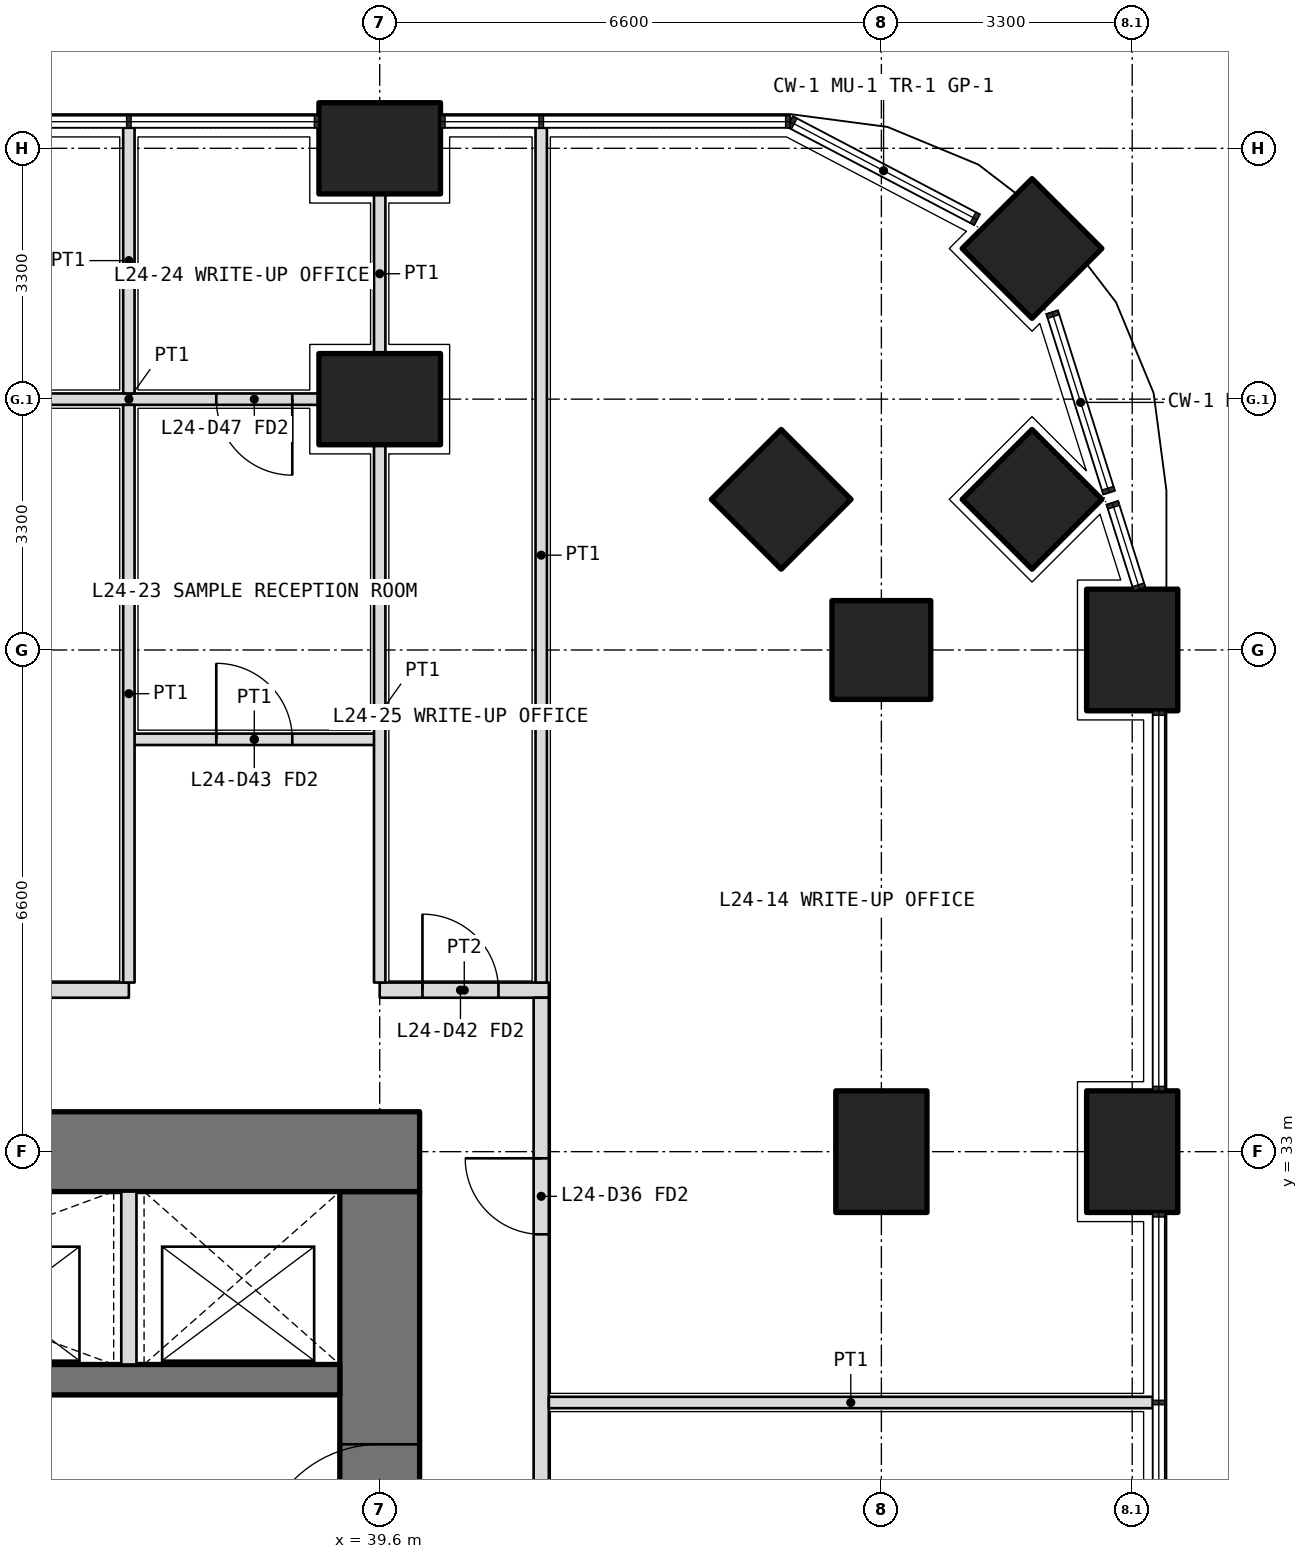
"""IFC4 building model, lengths in metres.
Left out: names, types, materials, properties, quantities, classifications, styles, units other than length and angle.
Written with IfcOpenShell. Run it as: python <this file> out.ifc"""

import sys

from ifc_helpers import new_model, si_unit, direction, frame, frame_2d, origin, origin_2d, place, context, subcontext, project, spatial, rectangle, extrude, element, fill, save


model = new_model("IFC4")
c1 = context("Model", 3, precision=1e-05, world=origin(), true_north=direction((0.0, 1.0)))
c2 = subcontext(c1, "Body", "Model", "MODEL_VIEW")
j1 = project(units=[si_unit("LENGTHUNIT", "METRE"), si_unit("PLANEANGLEUNIT", "RADIAN")], contexts=[c1])
p1 = place(None, origin())
s1 = spatial("IfcSite", under=j1, at=p1, CompositionType="ELEMENT")
p2 = place(p1, origin())
s2 = spatial("IfcBuilding", under=s1, at=p2, CompositionType="ELEMENT")
p3 = place(p2, frame((0.0, 0.0, 107.4)))
s3 = spatial("IfcBuildingStorey", under=s2, at=p3, CompositionType="ELEMENT", Elevation=107.4)
p4 = place(p3, frame((48.182, 44.882, 0.0), z_axis=(0.0, 0.0, 1.0), x_axis=(0.707106781187, 0.707106781187, 0.0)))
e1 = element("IfcColumn", 1, at=p4, inside=s3, PredefinedType="COLUMN", context=c2, shape_type="SweptSolid", body=[
    extrude(rectangle(XDim=1.3, YDim=1.3, at=origin_2d()), origin(), (0.0, 0.0, 1.0), 4.2),
])
for number, where, z_axis, x_axis in (
    (2, (49.5, 33.0, 0.0), (0.0, 0.0, 1.0), (0.0, 1.0, 0.0)),
    (3, (49.5, 39.6, 0.0), (0.0, 0.0, 1.0), (0.0, 1.0, 0.0)),
    (4, (39.6, 46.2, 0.0), (0.0, 0.0, 1.0), (1.0, 0.0, 0.0)),
):
    element("IfcColumn", number, at=place(p3, frame(where, z_axis=z_axis, x_axis=x_axis)), inside=s3, PredefinedType="COLUMN", context=c2, shape_type="SweptSolid", body=[
        extrude(rectangle(XDim=1.6, YDim=1.2, at=origin_2d()), origin(), (0.0, 0.0, 1.0), 4.2),
    ])
for number, where, z_axis, x_axis in (
    (5, (46.2, 39.6, 0.0), (0.0, 0.0, 1.0), (1.0, 0.0, 0.0)),
    (6, (48.182, 41.582, 0.0), (0.0, 0.0, 1.0), (0.707, 0.707, 0.0)),
):
    element("IfcColumn", number, at=place(p3, frame(where, z_axis=z_axis, x_axis=x_axis)), inside=s3, PredefinedType="COLUMN", context=c2, shape_type="SweptSolid", body=[
        extrude(rectangle(XDim=1.3, YDim=1.3, at=origin_2d()), origin(), (0.0, 0.0, 1.0), 4.2),
    ])
p5 = place(p3, frame((39.6, 42.9, 0.0), z_axis=(0.0, 0.0, 1.0), x_axis=(1.0, 0.0, 0.0)))
e7 = element("IfcColumn", 7, at=p5, inside=s3, PredefinedType="COLUMN", context=c2, shape_type="SweptSolid", body=[
    extrude(rectangle(XDim=1.6, YDim=1.2, at=origin_2d()), origin(), (0.0, 0.0, 1.0), 4.2),
])
p6 = place(p3, frame((44.882, 41.582, 0.0), z_axis=(0.0, 0.0, 1.0), x_axis=(0.707106781187, 0.707106781187, 0.0)))
e8 = element("IfcColumn", 8, at=p6, inside=s3, PredefinedType="COLUMN", context=c2, shape_type="SweptSolid", body=[
    extrude(rectangle(XDim=1.3, YDim=1.3, at=origin_2d()), origin(), (0.0, 0.0, 1.0), 4.2),
])
p7 = place(p3, frame((46.2, 33.0, 0.0), z_axis=(0.0, 0.0, 1.0), x_axis=(0.0, 1.0, 0.0)))
e9 = element("IfcColumn", 9, at=p7, inside=s3, PredefinedType="COLUMN", context=c2, shape_type="SweptSolid", body=[
    extrude(rectangle(XDim=1.6, YDim=1.2, at=origin_2d()), origin(), (0.0, 0.0, 1.0), 4.2),
])
p8 = place(p3, frame((39.6, 13.725, 0.0), z_axis=(0.0, 0.0, 1.0), x_axis=(0.0, 1.0, 0.0)))
e10 = element("IfcWall", 10, at=p8, inside=s3, PredefinedType="SHEAR", context=c2, shape_type="SweptSolid", body=[
    extrude(rectangle(XDim=18.75, YDim=1.05, at=frame_2d((9.375, 0.0))), origin(), (0.0, 0.0, 1.0), 4.2),
])
p9 = place(p8, frame((3.025, 0.0, 0.0)))
e11 = element("IfcOpeningElement", 11, at=p9, cuts=e10, PredefinedType="OPENING", context=c2, shape_type="SweptSolid", body=[
    extrude(rectangle(XDim=1.6, YDim=2.1, at=frame_2d((0.8, 1.05))), frame((0.0, 0.535, 0.0), z_axis=(0.0, -1.0, 0.0), x_axis=(1.0, 0.0, 0.0)), (0.0, 0.0, 1.0), 1.07),
])
p10 = place(p8, frame((13.825, 0.0, 0.0)))
e12 = element("IfcOpeningElement", 12, at=p10, cuts=e10, PredefinedType="OPENING", context=c2, shape_type="SweptSolid", body=[
    extrude(rectangle(XDim=1.6, YDim=2.1, at=frame_2d((0.8, 1.05))), frame((0.0, 0.535, 0.0), z_axis=(0.0, -1.0, 0.0), x_axis=(1.0, 0.0, 0.0)), (0.0, 0.0, 1.0), 1.07),
])
p11 = place(p3, frame((40.125, 33.0, 0.0), z_axis=(0.0, 0.0, 1.0), x_axis=(-1.0, 0.0, 0.0)))
e13 = element("IfcWall", 13, at=p11, inside=s3, PredefinedType="SHEAR", context=c2, shape_type="SweptSolid", body=[
    extrude(rectangle(XDim=27.45, YDim=1.05, at=frame_2d((13.725, 0.0))), origin(), (0.0, 0.0, 1.0), 4.2),
])
p12 = place(p3, frame((13.725, 30.0, 0.0), z_axis=(0.0, 0.0, 1.0), x_axis=(1.0, 0.0, 0.0)))
e14 = element("IfcWall", 14, at=p12, inside=s3, PredefinedType="SHEAR", context=c2, shape_type="SweptSolid", body=[
    extrude(rectangle(XDim=25.35, YDim=0.4, at=frame_2d((12.675, 0.0))), origin(), (0.0, 0.0, 1.0), 4.2),
])
p13 = place(p3, frame((36.3, 30.2, 0.0), z_axis=(0.0, 0.0, 1.0), x_axis=(0.0, 1.0, 0.0)))
e15 = element("IfcWall", 15, at=p13, inside=s3, PredefinedType="PARTITIONING", context=c2, shape_type="SweptSolid", body=[
    extrude(rectangle(XDim=2.275, YDim=0.2, at=frame_2d((1.138, 0.0))), origin(), (0.0, 0.0, 1.0), 4.2),
])
p14 = place(p3, frame((10.975, 35.125, 0.0), z_axis=(0.0, 0.0, 1.0), x_axis=(1.0, 0.0, 0.0)))
e16 = element("IfcWall", 16, at=p14, inside=s3, PredefinedType="PARTITIONING", context=c2, shape_type="SweptSolid", body=[
    extrude(rectangle(XDim=25.325, YDim=0.2, at=frame_2d((12.663, 0.0))), origin(), (0.0, 0.0, 1.0), 2.85),
])
p15 = place(p14, frame((0.663, 0.0, 0.0)))
e17 = element("IfcOpeningElement", 17, at=p15, cuts=e16, PredefinedType="OPENING", context=c2, shape_type="SweptSolid", body=[
    extrude(rectangle(XDim=1.0, YDim=2.1, at=frame_2d((0.5, 1.05))), frame((0.0, 0.11, 0.0), z_axis=(0.0, -1.0, 0.0), x_axis=(1.0, 0.0, 0.0)), (0.0, 0.0, 1.0), 0.22),
])
p16 = place(p14, frame((3.425, 0.0, 0.0)))
e18 = element("IfcOpeningElement", 18, at=p16, cuts=e16, PredefinedType="OPENING", context=c2, shape_type="SweptSolid", body=[
    extrude(rectangle(XDim=1.0, YDim=2.1, at=frame_2d((0.5, 1.05))), frame((0.0, 0.11, 0.0), z_axis=(0.0, -1.0, 0.0), x_axis=(1.0, 0.0, 0.0)), (0.0, 0.0, 1.0), 0.22),
])
p17 = place(p14, frame((6.725, 0.0, 0.0)))
e19 = element("IfcOpeningElement", 19, at=p17, cuts=e16, PredefinedType="OPENING", context=c2, shape_type="SweptSolid", body=[
    extrude(rectangle(XDim=1.0, YDim=2.1, at=frame_2d((0.5, 1.05))), frame((0.0, 0.11, 0.0), z_axis=(0.0, -1.0, 0.0), x_axis=(1.0, 0.0, 0.0)), (0.0, 0.0, 1.0), 0.22),
])
p18 = place(p14, frame((11.525, 0.0, 0.0)))
e20 = element("IfcOpeningElement", 20, at=p18, cuts=e16, PredefinedType="OPENING", context=c2, shape_type="SweptSolid", body=[
    extrude(rectangle(XDim=1.2, YDim=2.1, at=frame_2d((0.6, 1.05))), frame((0.0, 0.11, 0.0), z_axis=(0.0, -1.0, 0.0), x_axis=(1.0, 0.0, 0.0)), (0.0, 0.0, 1.0), 0.22),
])
p19 = place(p14, frame((19.775, 0.0, 0.0)))
e21 = element("IfcOpeningElement", 21, at=p19, cuts=e16, PredefinedType="OPENING", context=c2, shape_type="SweptSolid", body=[
    extrude(rectangle(XDim=1.2, YDim=2.1, at=frame_2d((0.6, 1.05))), frame((0.0, 0.11, 0.0), z_axis=(0.0, -1.0, 0.0), x_axis=(1.0, 0.0, 0.0)), (0.0, 0.0, 1.0), 0.22),
])
p20 = place(p3, frame((39.6, 35.125, 0.0), z_axis=(0.0, 0.0, 1.0), x_axis=(1.0, 0.0, 0.0)))
e22 = element("IfcWall", 22, at=p20, inside=s3, PredefinedType="PARTITIONING", context=c2, shape_type="SweptSolid", body=[
    extrude(rectangle(XDim=2.225, YDim=0.2, at=frame_2d((1.112, 0.0))), origin(), (0.0, 0.0, 1.0), 2.85),
])
p21 = place(p20, frame((0.562, 0.0, 0.0)))
e23 = element("IfcOpeningElement", 23, at=p21, cuts=e22, PredefinedType="OPENING", context=c2, shape_type="SweptSolid", body=[
    extrude(rectangle(XDim=1.0, YDim=2.1, at=frame_2d((0.5, 1.05))), frame((0.0, 0.11, 0.0), z_axis=(0.0, -1.0, 0.0), x_axis=(1.0, 0.0, 0.0)), (0.0, 0.0, 1.0), 0.22),
])
p22 = place(p3, frame((41.725, 7.4, 0.0), z_axis=(0.0, 0.0, 1.0), x_axis=(0.0, 1.0, 0.0)))
e24 = element("IfcWall", 24, at=p22, inside=s3, PredefinedType="PARTITIONING", context=c2, shape_type="SweptSolid", body=[
    extrude(rectangle(XDim=27.625, YDim=0.2, at=frame_2d((13.812, 0.0))), origin(), (0.0, 0.0, 1.0), 2.85),
])
p23 = place(p22, frame((5.65, 0.0, 0.0)))
e25 = element("IfcOpeningElement", 25, at=p23, cuts=e24, PredefinedType="OPENING", context=c2, shape_type="SweptSolid", body=[
    extrude(rectangle(XDim=1.0, YDim=2.1, at=frame_2d((0.5, 1.05))), frame((0.0, 0.11, 0.0), z_axis=(0.0, -1.0, 0.0), x_axis=(1.0, 0.0, 0.0)), (0.0, 0.0, 1.0), 0.22),
])
p24 = place(p22, frame((13.4, 0.0, 0.0)))
e26 = element("IfcOpeningElement", 26, at=p24, cuts=e24, PredefinedType="OPENING", context=c2, shape_type="SweptSolid", body=[
    extrude(rectangle(XDim=1.0, YDim=2.1, at=frame_2d((0.5, 1.05))), frame((0.0, 0.11, 0.0), z_axis=(0.0, -1.0, 0.0), x_axis=(1.0, 0.0, 0.0)), (0.0, 0.0, 1.0), 0.22),
])
p25 = place(p22, frame((16.75, 0.0, 0.0)))
e27 = element("IfcOpeningElement", 27, at=p25, cuts=e24, PredefinedType="OPENING", context=c2, shape_type="SweptSolid", body=[
    extrude(rectangle(XDim=0.9, YDim=2.1, at=frame_2d((0.45, 1.05))), frame((0.0, 0.11, 0.0), z_axis=(0.0, -1.0, 0.0), x_axis=(1.0, 0.0, 0.0)), (0.0, 0.0, 1.0), 0.22),
])
p26 = place(p22, frame((20.15, 0.0, 0.0)))
e28 = element("IfcOpeningElement", 28, at=p26, cuts=e24, PredefinedType="OPENING", context=c2, shape_type="SweptSolid", body=[
    extrude(rectangle(XDim=1.0, YDim=2.1, at=frame_2d((0.5, 1.05))), frame((0.0, 0.11, 0.0), z_axis=(0.0, -1.0, 0.0), x_axis=(1.0, 0.0, 0.0)), (0.0, 0.0, 1.0), 0.22),
])
p27 = place(p22, frame((24.512, 0.0, 0.0)))
e29 = element("IfcOpeningElement", 29, at=p27, cuts=e24, PredefinedType="OPENING", context=c2, shape_type="SweptSolid", body=[
    extrude(rectangle(XDim=1.0, YDim=2.1, at=frame_2d((0.5, 1.05))), frame((0.0, 0.11, 0.0), z_axis=(0.0, -1.0, 0.0), x_axis=(1.0, 0.0, 0.0)), (0.0, 0.0, 1.0), 0.22),
])
p28 = place(p3, frame((41.725, 46.47, 0.0), z_axis=(0.0, 0.0, 1.0), x_axis=(0.0, -1.0, 0.0)))
e30 = element("IfcWall", 30, at=p28, inside=s3, PredefinedType="PARTITIONING", context=c2, shape_type="SweptSolid", body=[
    extrude(rectangle(XDim=11.245, YDim=0.15, at=frame_2d((5.623, 0.0))), origin(), (0.0, 0.0, 1.0), 2.7),
])
p29 = place(p3, frame((49.77, 29.7, 0.0), z_axis=(0.0, 0.0, 1.0), x_axis=(-1.0, 0.0, 0.0)))
e31 = element("IfcWall", 31, at=p29, inside=s3, PredefinedType="PARTITIONING", context=c2, shape_type="SweptSolid", body=[
    extrude(rectangle(XDim=7.945, YDim=0.15, at=frame_2d((3.973, 0.0))), origin(), (0.0, 0.0, 1.0), 2.7),
])
p30 = place(p3, frame((38.8, 42.9, 0.0), z_axis=(0.0, 0.0, 1.0), x_axis=(-1.0, 0.0, 0.0)))
e32 = element("IfcWall", 32, at=p30, inside=s3, PredefinedType="PARTITIONING", context=c2, shape_type="SweptSolid", body=[
    extrude(rectangle(XDim=5.0, YDim=0.15, at=frame_2d((2.5, 0.0))), origin(), (0.0, 0.0, 1.0), 3.9),
])
p31 = place(p30, frame((0.35, 0.0, 0.0)))
e33 = element("IfcOpeningElement", 33, at=p31, cuts=e32, PredefinedType="OPENING", context=c2, shape_type="SweptSolid", body=[
    extrude(rectangle(XDim=1.0, YDim=2.1, at=frame_2d((0.5, 1.05))), frame((0.0, 0.085, 0.0), z_axis=(0.0, -1.0, 0.0), x_axis=(1.0, 0.0, 0.0)), (0.0, 0.0, 1.0), 0.17),
])
p32 = place(p3, frame((36.3, 38.425, 0.0), z_axis=(0.0, 0.0, 1.0), x_axis=(1.0, 0.0, 0.0)))
e34 = element("IfcWall", 34, at=p32, inside=s3, PredefinedType="PARTITIONING", context=c2, shape_type="SweptSolid", body=[
    extrude(rectangle(XDim=3.3, YDim=0.15, at=frame_2d((1.65, 0.0))), origin(), (0.0, 0.0, 1.0), 2.85),
])
p33 = place(p32, frame((1.15, 0.0, 0.0)))
e35 = element("IfcOpeningElement", 35, at=p33, cuts=e34, PredefinedType="OPENING", context=c2, shape_type="SweptSolid", body=[
    extrude(rectangle(XDim=1.0, YDim=2.1, at=frame_2d((0.5, 1.05))), frame((0.0, 0.085, 0.0), z_axis=(0.0, -1.0, 0.0), x_axis=(1.0, 0.0, 0.0)), (0.0, 0.0, 1.0), 0.17),
])
p34 = place(p3, frame((36.3, 46.47, 0.0), z_axis=(0.0, 0.0, 1.0), x_axis=(0.0, -1.0, 0.0)))
e36 = element("IfcWall", 36, at=p34, inside=s3, PredefinedType="PARTITIONING", context=c2, shape_type="SweptSolid", body=[
    extrude(rectangle(XDim=3.495, YDim=0.15, at=frame_2d((1.748, 0.0))), origin(), (0.0, 0.0, 1.0), 2.7),
])
p35 = place(p3, frame((36.3, 42.825, 0.0), z_axis=(0.0, 0.0, 1.0), x_axis=(0.0, -1.0, 0.0)))
e37 = element("IfcWall", 37, at=p35, inside=s3, PredefinedType="PARTITIONING", context=c2, shape_type="SweptSolid", body=[
    extrude(rectangle(XDim=7.6, YDim=0.15, at=frame_2d((3.8, 0.0))), origin(), (0.0, 0.0, 1.0), 3.9),
])
p36 = place(p3, frame((39.6, 45.6, 0.0), z_axis=(0.0, 0.0, 1.0), x_axis=(0.0, -1.0, 0.0)))
e38 = element("IfcWall", 38, at=p36, inside=s3, PredefinedType="PARTITIONING", context=c2, shape_type="SweptSolid", body=[
    extrude(rectangle(XDim=2.1, YDim=0.15, at=frame_2d((1.05, 0.0))), origin(), (0.0, 0.0, 1.0), 2.85),
])
p37 = place(p3, frame((39.6, 42.3, 0.0), z_axis=(0.0, 0.0, 1.0), x_axis=(0.0, -1.0, 0.0)))
e39 = element("IfcWall", 39, at=p37, inside=s3, PredefinedType="PARTITIONING", context=c2, shape_type="SweptSolid", body=[
    extrude(rectangle(XDim=7.075, YDim=0.15, at=frame_2d((3.538, 0.0))), origin(), (0.0, 0.0, 1.0), 2.85),
])
p38 = place(p27, origin())
e40 = element("IfcDoor", 40, at=p38, inside=s3, OperationType="SINGLE_SWING_RIGHT", PredefinedType="DOOR", context=c2, shape_type="SweptSolid", body=[
    extrude(rectangle(XDim=1.0, YDim=2.1, at=frame_2d((0.5, 1.05))), frame((0.0, 0.025, 0.0), z_axis=(0.0, -1.0, 0.0), x_axis=(1.0, 0.0, 0.0)), (0.0, 0.0, 1.0), 0.05),
])
fill(e29, e40)
p39 = place(p33, origin())
e41 = element("IfcDoor", 41, at=p39, inside=s3, OperationType="SINGLE_SWING_LEFT", PredefinedType="DOOR", context=c2, shape_type="SweptSolid", body=[
    extrude(rectangle(XDim=1.0, YDim=2.1, at=frame_2d((0.5, 1.05))), frame((0.0, 0.025, 0.0), z_axis=(0.0, -1.0, 0.0), x_axis=(1.0, 0.0, 0.0)), (0.0, 0.0, 1.0), 0.05),
])
fill(e35, e41)
p40 = place(p31, origin())
e42 = element("IfcDoor", 42, at=p40, inside=s3, OperationType="SINGLE_SWING_LEFT", PredefinedType="DOOR", context=c2, shape_type="SweptSolid", body=[
    extrude(rectangle(XDim=1.0, YDim=2.1, at=frame_2d((0.5, 1.05))), frame((0.0, 0.025, 0.0), z_axis=(0.0, -1.0, 0.0), x_axis=(1.0, 0.0, 0.0)), (0.0, 0.0, 1.0), 0.05),
])
fill(e33, e42)
p41 = place(p21, origin())
e43 = element("IfcDoor", 43, at=p41, inside=s3, OperationType="SINGLE_SWING_LEFT", PredefinedType="DOOR", context=c2, shape_type="SweptSolid", body=[
    extrude(rectangle(XDim=1.0, YDim=2.1, at=frame_2d((0.5, 1.05))), frame((0.0, 0.025, 0.0), z_axis=(0.0, -1.0, 0.0), x_axis=(1.0, 0.0, 0.0)), (0.0, 0.0, 1.0), 0.05),
])
fill(e23, e43)
p42 = place(p10, origin())
e44 = element("IfcDoor", 44, at=p42, inside=s3, OperationType="DOUBLE_DOOR_DOUBLE_SWING", PredefinedType="DOOR", context=c2, shape_type="SweptSolid", body=[
    extrude(rectangle(XDim=1.6, YDim=2.1, at=frame_2d((0.8, 1.05))), frame((0.0, 0.025, 0.0), z_axis=(0.0, -1.0, 0.0), x_axis=(1.0, 0.0, 0.0)), (0.0, 0.0, 1.0), 0.05),
])
fill(e12, e44)
save(model, sys.argv[1])
